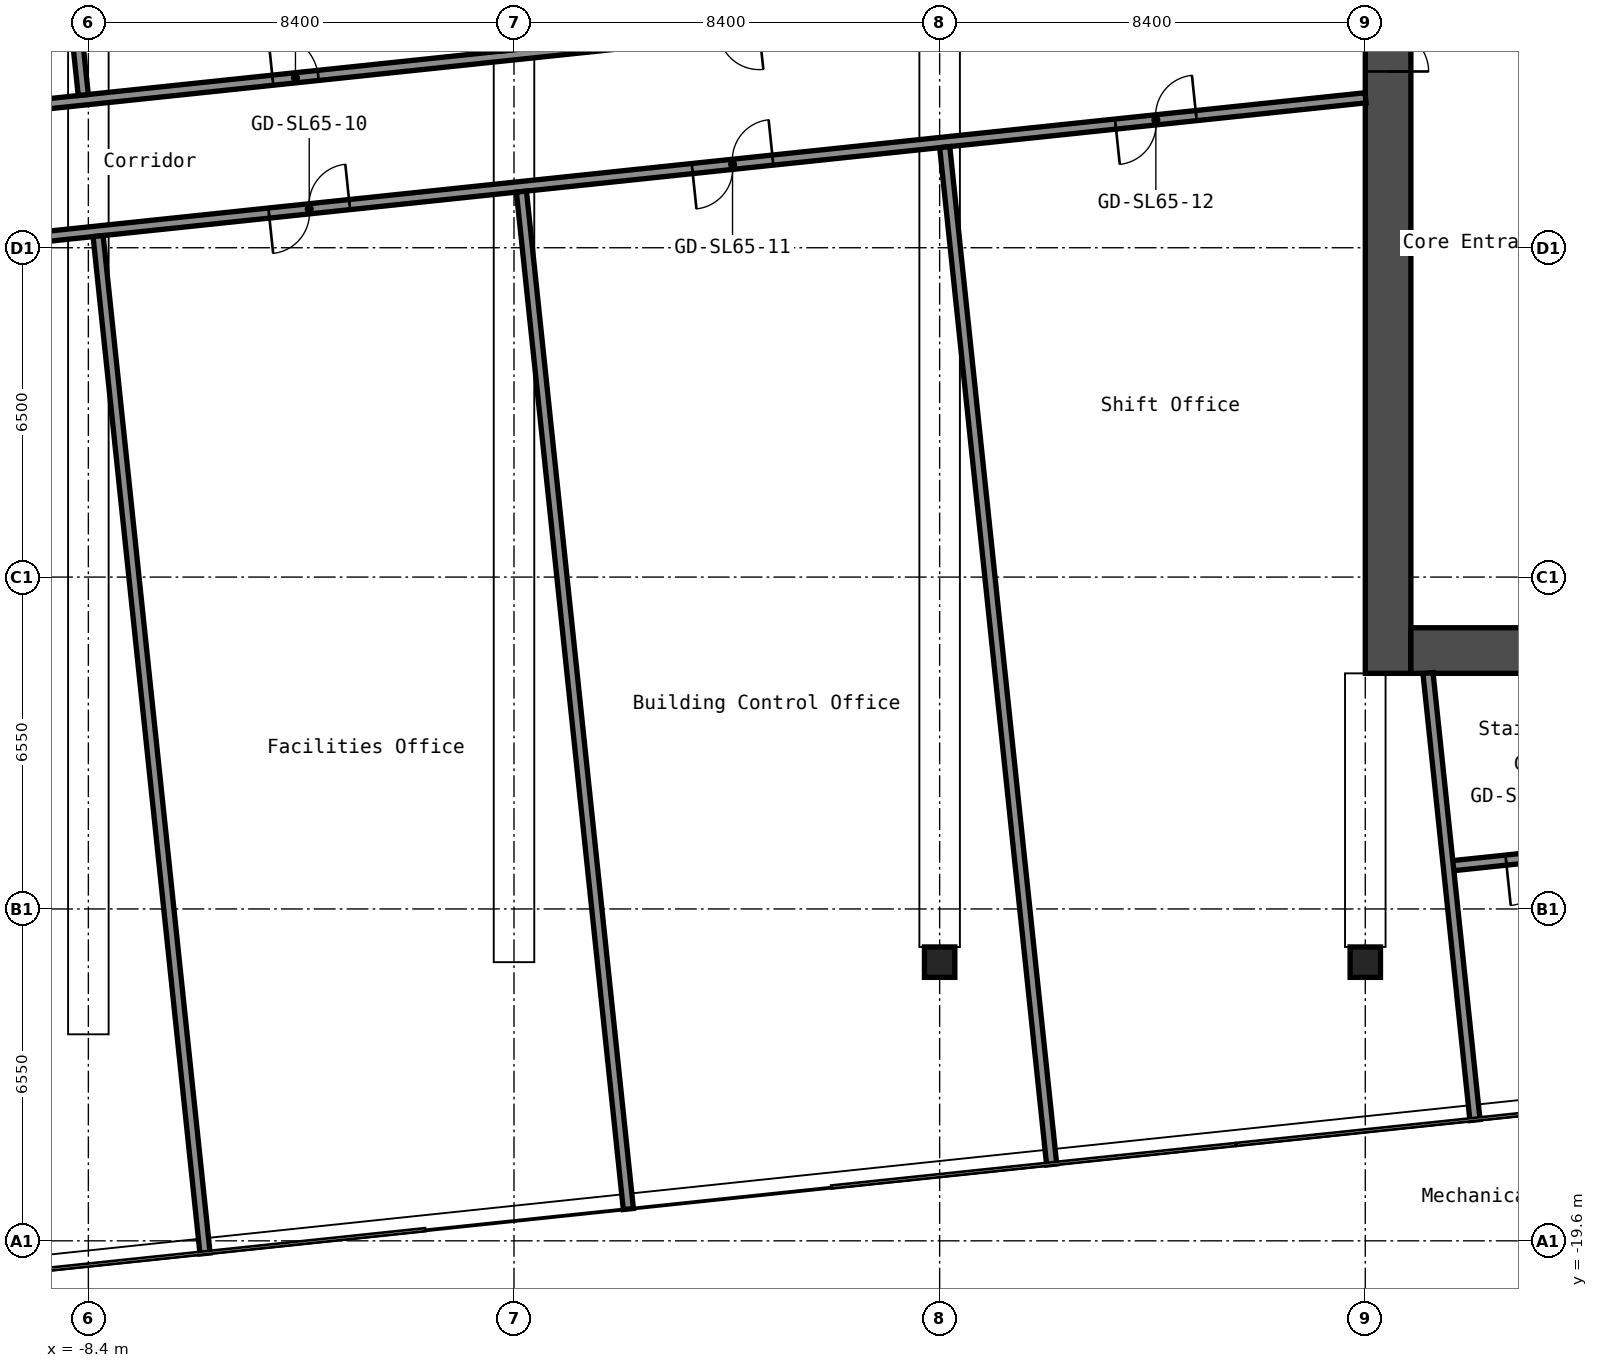
"""IFC4 building model, lengths in metres.
Left out: names, types, materials, properties, quantities, classifications, styles, units other than length and angle.
Written with IfcOpenShell. Run it as: python <this file> out.ifc"""

import sys

from ifc_helpers import new_model, si_unit, direction, frame, frame_2d, origin, origin_2d, place, context, subcontext, project, spatial, rectangle, hollow_rectangle, extrude, element, fill, save


model = new_model("IFC4")
c1 = context("Model", 3, precision=1e-05, world=origin(), true_north=direction((0.0, 1.0)))
c2 = subcontext(c1, "Body", "Model", "MODEL_VIEW")
j1 = project(units=[si_unit("LENGTHUNIT", "METRE"), si_unit("PLANEANGLEUNIT", "RADIAN")], contexts=[c1])
p1 = place(None, origin())
s1 = spatial("IfcSite", under=j1, at=p1, CompositionType="ELEMENT")
p2 = place(p1, origin())
s2 = spatial("IfcBuilding", under=s1, at=p2, CompositionType="ELEMENT")
p3 = place(p2, frame((0.0, 0.0, 228.2)))
s3 = spatial("IfcBuildingStorey", under=s2, at=p3, CompositionType="ELEMENT", Elevation=228.2)
for number, where, z_axis, x_axis in (
    (1, (8.4, -14.1, 0.0), (0.0, 0.0, 1.0), (1.0, 0.0, 0.0)),
    (2, (16.8, -14.1, 0.0), (0.0, 0.0, 1.0), (1.0, 0.0, 0.0)),
):
    element("IfcColumn", number, at=place(p3, frame(where, z_axis=z_axis, x_axis=x_axis)), inside=s3, PredefinedType="COLUMN", context=c2, shape_type="SweptSolid", body=[
        extrude(hollow_rectangle(XDim=0.6, YDim=0.6, WallThickness=0.025, InnerFilletRadius=0.038, OuterFilletRadius=0.062, at=origin_2d()), origin(), (0.0, 0.0, 1.0), 4.1),
    ])
p4 = place(p3, frame((17.25, -8.4, 0.0), z_axis=(0.0, 0.0, 1.0), x_axis=(0.0, 1.0, 0.0)))
e3 = element("IfcWall", 3, at=p4, inside=s3, PredefinedType="SHEAR", context=c2, shape_type="SweptSolid", body=[
    extrude(rectangle(XDim=16.8, YDim=0.9, at=frame_2d((8.4, 0.0))), origin(), (0.0, 0.0, 1.0), 4.1),
])
p5 = place(p4, frame((11.879, 0.0, 0.0)))
e4 = element("IfcOpeningElement", 4, at=p5, cuts=e3, PredefinedType="OPENING", context=c2, shape_type="SweptSolid", body=[
    extrude(rectangle(XDim=1.6, YDim=2.1, at=frame_2d((0.8, 1.05))), frame((0.0, 0.46, 0.0), z_axis=(0.0, -1.0, 0.0), x_axis=(1.0, 0.0, 0.0)), (0.0, 0.0, 1.0), 0.92),
])
p6 = place(p3, frame((17.7, -7.95, 0.0), z_axis=(0.0, 0.0, 1.0), x_axis=(1.0, 0.0, 0.0)))
e5 = element("IfcWall", 5, at=p6, inside=s3, PredefinedType="SHEAR", context=c2, shape_type="SweptSolid", body=[
    extrude(rectangle(XDim=15.0, YDim=0.9, at=frame_2d((7.5, 0.0))), origin(), (0.0, 0.0, 1.0), 4.1),
])
p7 = place(p6, frame((2.55, 0.0, 0.0)))
e6 = element("IfcOpeningElement", 6, at=p7, cuts=e5, PredefinedType="OPENING", context=c2, shape_type="SweptSolid", body=[
    extrude(rectangle(XDim=1.0, YDim=2.1, at=frame_2d((0.5, 1.05))), frame((0.0, 0.46, 0.0), z_axis=(0.0, -1.0, 0.0), x_axis=(1.0, 0.0, 0.0)), (0.0, 0.0, 1.0), 0.92),
])
p8 = place(p3, frame((18.438, -12.206, 0.0), z_axis=(0.0, 0.0, 1.0), x_axis=(0.994522778466, 0.104520060816, 0.0)))
e7 = element("IfcWall", 7, at=p8, inside=s3, PredefinedType="PARTITIONING", context=c2, shape_type="SweptSolid", body=[
    extrude(rectangle(XDim=20.6, YDim=0.2, at=frame_2d((10.3, 0.0))), origin(), (0.0, 0.0, 1.0), 2.6),
])
p9 = place(p8, frame((1.145, 0.0, 0.0)))
e8 = element("IfcOpeningElement", 8, at=p9, cuts=e7, PredefinedType="OPENING", context=c2, shape_type="SweptSolid", body=[
    extrude(rectangle(XDim=0.9, YDim=2.1, at=frame_2d((0.45, 1.05))), frame((0.0, 0.11, 0.0), z_axis=(0.0, -1.0, 0.0), x_axis=(1.0, 0.0, 0.0)), (0.0, 0.0, 1.0), 0.22),
])
p10 = place(p8, frame((5.345, 0.0, 0.0)))
e9 = element("IfcOpeningElement", 9, at=p10, cuts=e7, PredefinedType="OPENING", context=c2, shape_type="SweptSolid", body=[
    extrude(rectangle(XDim=0.9, YDim=2.1, at=frame_2d((0.45, 1.05))), frame((0.0, 0.11, 0.0), z_axis=(0.0, -1.0, 0.0), x_axis=(1.0, 0.0, 0.0)), (0.0, 0.0, 1.0), 0.22),
])
p11 = place(p8, frame((10.47, 0.0, 0.0)))
e10 = element("IfcOpeningElement", 10, at=p11, cuts=e7, PredefinedType="OPENING", context=c2, shape_type="SweptSolid", body=[
    extrude(rectangle(XDim=0.9, YDim=2.1, at=frame_2d((0.45, 1.05))), frame((0.0, 0.11, 0.0), z_axis=(0.0, -1.0, 0.0), x_axis=(1.0, 0.0, 0.0)), (0.0, 0.0, 1.0), 0.22),
])
p12 = place(p8, frame((13.82, 0.0, 0.0)))
e11 = element("IfcOpeningElement", 11, at=p12, cuts=e7, PredefinedType="OPENING", context=c2, shape_type="SweptSolid", body=[
    extrude(rectangle(XDim=0.9, YDim=2.1, at=frame_2d((0.45, 1.05))), frame((0.0, 0.11, 0.0), z_axis=(0.0, -1.0, 0.0), x_axis=(1.0, 0.0, 0.0)), (0.0, 0.0, 1.0), 0.22),
])
p13 = place(p8, frame((19.367, 0.0, 0.0)))
e12 = element("IfcOpeningElement", 12, at=p13, cuts=e7, PredefinedType="OPENING", context=c2, shape_type="SweptSolid", body=[
    extrude(rectangle(XDim=0.9, YDim=2.1, at=frame_2d((0.45, 1.05))), frame((0.0, 0.11, 0.0), z_axis=(0.0, -1.0, 0.0), x_axis=(1.0, 0.0, 0.0)), (0.0, 0.0, 1.0), 0.22),
])
p14 = place(p3, frame((-16.572, -0.549, 0.0), z_axis=(0.0, 0.0, 1.0), x_axis=(0.994521146831, 0.104535584879, 0.0)))
e13 = element("IfcWall", 13, at=p14, inside=s3, PredefinedType="PARTITIONING", context=c2, shape_type="SweptSolid", body=[
    extrude(rectangle(XDim=33.561, YDim=0.2, at=frame_2d((16.78, 0.0))), origin(), (0.0, 0.0, 1.0), 4.1),
])
p15 = place(p14, frame((3.75, 0.0, 0.0)))
e14 = element("IfcOpeningElement", 14, at=p15, cuts=e13, PredefinedType="OPENING", context=c2, shape_type="SweptSolid", body=[
    extrude(rectangle(XDim=0.9, YDim=2.1, at=frame_2d((0.45, 1.05))), frame((0.0, 0.11, 0.0), z_axis=(0.0, -1.0, 0.0), x_axis=(1.0, 0.0, 0.0)), (0.0, 0.0, 1.0), 0.22),
])
p16 = place(p14, frame((11.8, 0.0, 0.0)))
e15 = element("IfcOpeningElement", 15, at=p16, cuts=e13, PredefinedType="OPENING", context=c2, shape_type="SweptSolid", body=[
    extrude(rectangle(XDim=1.6, YDim=2.1, at=frame_2d((0.8, 1.05))), frame((0.0, 0.11, 0.0), z_axis=(0.0, -1.0, 0.0), x_axis=(1.0, 0.0, 0.0)), (0.0, 0.0, 1.0), 0.22),
])
p17 = place(p14, frame((20.2, 0.0, 0.0)))
e16 = element("IfcOpeningElement", 16, at=p17, cuts=e13, PredefinedType="OPENING", context=c2, shape_type="SweptSolid", body=[
    extrude(rectangle(XDim=1.6, YDim=2.1, at=frame_2d((0.8, 1.05))), frame((0.0, 0.11, 0.0), z_axis=(0.0, -1.0, 0.0), x_axis=(1.0, 0.0, 0.0)), (0.0, 0.0, 1.0), 0.22),
])
p18 = place(p14, frame((28.6, 0.0, 0.0)))
e17 = element("IfcOpeningElement", 17, at=p18, cuts=e13, PredefinedType="OPENING", context=c2, shape_type="SweptSolid", body=[
    extrude(rectangle(XDim=1.6, YDim=2.1, at=frame_2d((0.8, 1.05))), frame((0.0, 0.11, 0.0), z_axis=(0.0, -1.0, 0.0), x_axis=(1.0, 0.0, 0.0)), (0.0, 0.0, 1.0), 0.22),
])
p19 = place(p3, frame((-16.805, 2.041, 0.0), z_axis=(0.0, 0.0, 1.0), x_axis=(0.994521146831, 0.104535584879, 0.0)))
e18 = element("IfcWall", 18, at=p19, inside=s3, PredefinedType="PARTITIONING", context=c2, shape_type="SweptSolid", body=[
    extrude(rectangle(XDim=33.561, YDim=0.2, at=frame_2d((16.78, 0.0))), origin(), (0.0, 0.0, 1.0), 4.1),
])
p20 = place(p19, frame((3.711, 0.0, 0.0)))
e19 = element("IfcOpeningElement", 19, at=p20, cuts=e18, PredefinedType="OPENING", context=c2, shape_type="SweptSolid", body=[
    extrude(rectangle(XDim=0.9, YDim=2.1, at=frame_2d((0.45, 1.05))), frame((0.0, 0.11, 0.0), z_axis=(0.0, -1.0, 0.0), x_axis=(1.0, 0.0, 0.0)), (0.0, 0.0, 1.0), 0.22),
])
p21 = place(p19, frame((12.111, 0.0, 0.0)))
e20 = element("IfcOpeningElement", 20, at=p21, cuts=e18, PredefinedType="OPENING", context=c2, shape_type="SweptSolid", body=[
    extrude(rectangle(XDim=0.9, YDim=2.1, at=frame_2d((0.45, 1.05))), frame((0.0, 0.11, 0.0), z_axis=(0.0, -1.0, 0.0), x_axis=(1.0, 0.0, 0.0)), (0.0, 0.0, 1.0), 0.22),
])
p22 = place(p19, frame((20.161, 0.0, 0.0)))
e21 = element("IfcOpeningElement", 21, at=p22, cuts=e18, PredefinedType="OPENING", context=c2, shape_type="SweptSolid", body=[
    extrude(rectangle(XDim=1.6, YDim=2.1, at=frame_2d((0.8, 1.05))), frame((0.0, 0.11, 0.0), z_axis=(0.0, -1.0, 0.0), x_axis=(1.0, 0.0, 0.0)), (0.0, 0.0, 1.0), 0.22),
])
p23 = place(p19, frame((28.561, 0.0, 0.0)))
e22 = element("IfcOpeningElement", 22, at=p23, cuts=e18, PredefinedType="OPENING", context=c2, shape_type="SweptSolid", body=[
    extrude(rectangle(XDim=1.6, YDim=2.1, at=frame_2d((0.8, 1.05))), frame((0.0, 0.11, 0.0), z_axis=(0.0, -1.0, 0.0), x_axis=(1.0, 0.0, 0.0)), (0.0, 0.0, 1.0), 0.22),
])
p24 = place(p3, frame((-6.097, -19.85, 0.0), z_axis=(0.0, 0.0, 1.0), x_axis=(-0.104534347018, 0.994521276944, 0.0)))
e23 = element("IfcWall", 23, at=p24, inside=s3, PredefinedType="PARTITIONING", context=c2, shape_type="SweptSolid", body=[
    extrude(rectangle(XDim=20.19, YDim=0.2, at=frame_2d((10.095, 0.0))), origin(), (0.0, 0.0, 1.0), 4.1),
])
p25 = place(p3, frame((-8.5, 3.014, 0.0), z_axis=(0.0, 0.0, 1.0), x_axis=(-0.104535604125, 0.994521144808, 0.0)))
e24 = element("IfcWall", 24, at=p25, inside=s3, PredefinedType="PARTITIONING", context=c2, shape_type="SweptSolid", body=[
    extrude(rectangle(XDim=20.19, YDim=0.2, at=frame_2d((10.095, 0.0))), origin(), (0.0, 0.0, 1.0), 4.1),
])
p26 = place(p3, frame((2.257, -18.972, 0.0), z_axis=(0.0, 0.0, 1.0), x_axis=(-0.104534347018, 0.994521276944, 0.0)))
e25 = element("IfcWall", 25, at=p26, inside=s3, PredefinedType="PARTITIONING", context=c2, shape_type="SweptSolid", body=[
    extrude(rectangle(XDim=20.19, YDim=0.2, at=frame_2d((10.095, 0.0))), origin(), (0.0, 0.0, 1.0), 4.1),
])
p27 = place(p3, frame((10.611, -18.094, 0.0), z_axis=(0.0, 0.0, 1.0), x_axis=(-0.104535604125, 0.994521144808, 0.0)))
e26 = element("IfcWall", 26, at=p27, inside=s3, PredefinedType="PARTITIONING", context=c2, shape_type="SweptSolid", body=[
    extrude(rectangle(XDim=20.19, YDim=0.2, at=frame_2d((10.095, 0.0))), origin(), (0.0, 0.0, 1.0), 4.1),
])
p28 = place(p3, frame((18.965, -17.216, 0.0), z_axis=(0.0, 0.0, 1.0), x_axis=(-0.104541500485, 0.994520525015, 0.0)))
e27 = element("IfcWall", 27, at=p28, inside=s3, PredefinedType="PARTITIONING", context=c2, shape_type="SweptSolid", body=[
    extrude(rectangle(XDim=8.87, YDim=0.2, at=frame_2d((4.435, 0.0))), origin(), (0.0, 0.0, 1.0), 4.1),
])
p29 = place(p5, origin())
e28 = element("IfcDoor", 28, at=p29, inside=s3, OperationType="DOUBLE_DOOR_SINGLE_SWING", PredefinedType="DOOR", context=c2, shape_type="SweptSolid", body=[
    extrude(rectangle(XDim=1.6, YDim=2.1, at=frame_2d((0.8, 1.05))), frame((0.0, 0.025, 0.0), z_axis=(0.0, -1.0, 0.0), x_axis=(1.0, 0.0, 0.0)), (0.0, 0.0, 1.0), 0.05),
])
fill(e4, e28)
p30 = place(p9, origin())
e29 = element("IfcDoor", 29, at=p30, inside=s3, OperationType="SINGLE_SWING_LEFT", PredefinedType="DOOR", context=c2, shape_type="SweptSolid", body=[
    extrude(rectangle(XDim=0.9, YDim=2.1, at=frame_2d((0.45, 1.05))), frame((0.0, 0.025, 0.0), z_axis=(0.0, -1.0, 0.0), x_axis=(1.0, 0.0, 0.0)), (0.0, 0.0, 1.0), 0.05),
])
fill(e8, e29)
p31 = place(p16, origin())
e30 = element("IfcDoor", 30, at=p31, inside=s3, OperationType="DOUBLE_DOOR_SINGLE_SWING", PredefinedType="DOOR", context=c2, shape_type="SweptSolid", body=[
    extrude(rectangle(XDim=1.6, YDim=2.1, at=frame_2d((0.8, 1.05))), frame((0.0, 0.025, 0.0), z_axis=(0.0, -1.0, 0.0), x_axis=(1.0, 0.0, 0.0)), (0.0, 0.0, 1.0), 0.05),
])
fill(e15, e30)
p32 = place(p17, origin())
e31 = element("IfcDoor", 31, at=p32, inside=s3, OperationType="DOUBLE_DOOR_SINGLE_SWING", PredefinedType="DOOR", context=c2, shape_type="SweptSolid", body=[
    extrude(rectangle(XDim=1.6, YDim=2.1, at=frame_2d((0.8, 1.05))), frame((0.0, 0.025, 0.0), z_axis=(0.0, -1.0, 0.0), x_axis=(1.0, 0.0, 0.0)), (0.0, 0.0, 1.0), 0.05),
])
fill(e16, e31)
p33 = place(p18, origin())
e32 = element("IfcDoor", 32, at=p33, inside=s3, OperationType="DOUBLE_DOOR_SINGLE_SWING", PredefinedType="DOOR", context=c2, shape_type="SweptSolid", body=[
    extrude(rectangle(XDim=1.6, YDim=2.1, at=frame_2d((0.8, 1.05))), frame((0.0, 0.025, 0.0), z_axis=(0.0, -1.0, 0.0), x_axis=(1.0, 0.0, 0.0)), (0.0, 0.0, 1.0), 0.05),
])
fill(e17, e32)
p34 = place(p21, origin())
e33 = element("IfcDoor", 33, at=p34, inside=s3, OperationType="SINGLE_SWING_RIGHT", PredefinedType="DOOR", context=c2, shape_type="SweptSolid", body=[
    extrude(rectangle(XDim=0.9, YDim=2.1, at=frame_2d((0.45, 1.05))), frame((0.0, 0.025, 0.0), z_axis=(0.0, -1.0, 0.0), x_axis=(1.0, 0.0, 0.0)), (0.0, 0.0, 1.0), 0.05),
])
fill(e20, e33)
save(model, sys.argv[1])
